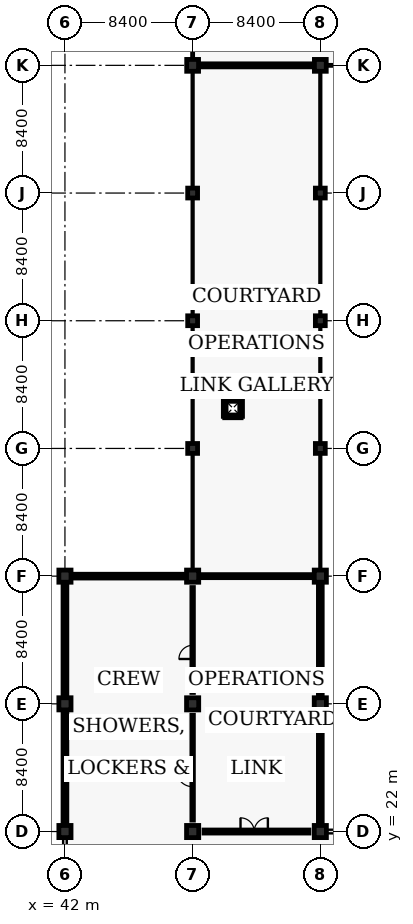
"""IFC4 building model, lengths in metres.
Left out: names, types, materials, properties, quantities, classifications, styles, units other than length and angle.
Written with IfcOpenShell. Run it as: python <this file> out.ifc"""

import sys

from ifc_helpers import new_model, si_unit, direction, frame, frame_2d, origin, origin_2d, place, context, subcontext, project, spatial, rectangle, circle, extrude, element, fill, save


model = new_model("IFC4")
c1 = context("Model", 3, precision=1e-05, world=origin(), true_north=direction((0.0, 1.0)))
c2 = subcontext(c1, "Body", "Model", "MODEL_VIEW")
j1 = project(units=[si_unit("LENGTHUNIT", "METRE"), si_unit("PLANEANGLEUNIT", "RADIAN")], contexts=[c1])
p1 = place(None, origin())
s1 = spatial("IfcSite", under=j1, at=p1, CompositionType="ELEMENT")
p2 = place(p1, origin())
s2 = spatial("IfcBuilding", under=s1, at=p2, CompositionType="ELEMENT")
p3 = place(p2, frame((0.0, 0.0, 5.44)))
s3 = spatial("IfcBuildingStorey", under=s2, at=p3, CompositionType="ELEMENT", Elevation=5.44)
for number, where, z_axis, x_axis in (
    (1, (50.4, 47.2, 0.0), (0.0, 0.0, 1.0), (1.0, 0.0, 0.0)),
    (2, (50.4, 55.6, 0.0), (0.0, 0.0, 1.0), (1.0, 0.0, 0.0)),
    (3, (50.4, 64.0, 0.0), (0.0, 0.0, 1.0), (1.0, 0.0, 0.0)),
    (4, (58.8, 47.2, 0.0), (0.0, 0.0, 1.0), (1.0, 0.0, 0.0)),
    (5, (58.8, 55.6, 0.0), (0.0, 0.0, 1.0), (1.0, 0.0, 0.0)),
    (6, (58.8, 64.0, 0.0), (0.0, 0.0, 1.0), (1.0, 0.0, 0.0)),
):
    element("IfcColumn", number, at=place(p3, frame(where, z_axis=z_axis, x_axis=x_axis)), inside=s3, PredefinedType="COLUMN", context=c2, shape_type="SweptSolid", body=[
        extrude(circle(Radius=0.325, at=origin_2d()), origin(), (0.0, 0.0, 1.0), 4.16),
    ])
for number, where, z_axis, x_axis in (
    (7, (50.4, 72.4, 0.0), (0.0, 0.0, 1.0), (1.0, 0.0, 0.0)),
    (8, (58.8, 72.4, 0.0), (0.0, 0.0, 1.0), (1.0, 0.0, 0.0)),
):
    element("IfcColumn", number, at=place(p3, frame(where, z_axis=z_axis, x_axis=x_axis)), inside=s3, PredefinedType="COLUMN", context=c2, shape_type="SweptSolid", body=[
        extrude(circle(Radius=0.39, at=origin_2d()), origin(), (0.0, 0.0, 1.0), 4.16),
    ])
for number, where, z_axis, x_axis in (
    (9, (42.0, 22.0, 0.0), (0.0, 0.0, 1.0), (1.0, 0.0, 0.0)),
    (10, (50.4, 22.0, 0.0), (0.0, 0.0, 1.0), (1.0, 0.0, 0.0)),
    (11, (58.8, 22.0, 0.0), (0.0, 0.0, 1.0), (1.0, 0.0, 0.0)),
    (12, (42.0, 30.4, 0.0), (0.0, 0.0, 1.0), (1.0, 0.0, 0.0)),
    (13, (42.0, 38.8, 0.0), (0.0, 0.0, 1.0), (1.0, 0.0, 0.0)),
    (14, (50.4, 30.4, 0.0), (0.0, 0.0, 1.0), (1.0, 0.0, 0.0)),
    (15, (50.4, 38.8, 0.0), (0.0, 0.0, 1.0), (1.0, 0.0, 0.0)),
    (16, (58.8, 30.4, 0.0), (0.0, 0.0, 1.0), (1.0, 0.0, 0.0)),
    (17, (58.8, 38.8, 0.0), (0.0, 0.0, 1.0), (1.0, 0.0, 0.0)),
):
    element("IfcColumn", number, at=place(p3, frame(where, z_axis=z_axis, x_axis=x_axis)), inside=s3, PredefinedType="COLUMN", context=c2, shape_type="SweptSolid", body=[
        extrude(rectangle(XDim=0.8, YDim=0.8, at=origin_2d()), origin(), (0.0, 0.0, 1.0), 4.16),
    ])
p4 = place(p3, frame((42.0, 30.0, 0.0), z_axis=(0.0, 0.0, 1.0), x_axis=(0.0, -1.0, 0.0)))
e18 = element("IfcWall", 18, at=p4, inside=s3, PredefinedType="SOLIDWALL", context=c2, shape_type="SweptSolid", body=[
    extrude(rectangle(XDim=7.6, YDim=0.25, at=frame_2d((3.8, 0.0))), origin(), (0.0, 0.0, 1.0), 3.345),
])
p5 = place(p4, frame((1.64, 0.0, 0.95)))
e19 = element("IfcOpeningElement", 19, at=p5, cuts=e18, PredefinedType="OPENING", context=c2, shape_type="SweptSolid", body=[
    extrude(rectangle(XDim=1.6, YDim=1.35, at=frame_2d((0.8, 0.675))), frame((0.0, 0.135, 0.0), z_axis=(0.0, -1.0, 0.0), x_axis=(1.0, 0.0, 0.0)), (0.0, 0.0, 1.0), 0.27),
])
p6 = place(p4, frame((4.34, 0.0, 0.95)))
e20 = element("IfcOpeningElement", 20, at=p6, cuts=e18, PredefinedType="OPENING", context=c2, shape_type="SweptSolid", body=[
    extrude(rectangle(XDim=1.3, YDim=1.35, at=frame_2d((0.65, 0.675))), frame((0.0, 0.135, 0.0), z_axis=(0.0, -1.0, 0.0), x_axis=(1.0, 0.0, 0.0)), (0.0, 0.0, 1.0), 0.27),
])
p7 = place(p3, frame((58.8, 22.4, 0.0), z_axis=(0.0, 0.0, 1.0), x_axis=(0.0, 1.0, 0.0)))
e21 = element("IfcWall", 21, at=p7, inside=s3, PredefinedType="SOLIDWALL", context=c2, shape_type="SweptSolid", body=[
    extrude(rectangle(XDim=7.6, YDim=0.25, at=frame_2d((3.8, 0.0))), origin(), (0.0, 0.0, 1.0), 3.345),
])
p8 = place(p7, frame((1.64, 0.0, 0.95)))
e22 = element("IfcOpeningElement", 22, at=p8, cuts=e21, PredefinedType="OPENING", context=c2, shape_type="SweptSolid", body=[
    extrude(rectangle(XDim=1.6, YDim=1.35, at=frame_2d((0.8, 0.675))), frame((0.0, 0.135, 0.0), z_axis=(0.0, -1.0, 0.0), x_axis=(1.0, 0.0, 0.0)), (0.0, 0.0, 1.0), 0.27),
])
p9 = place(p7, frame((4.34, 0.0, 0.95)))
e23 = element("IfcOpeningElement", 23, at=p9, cuts=e21, PredefinedType="OPENING", context=c2, shape_type="SweptSolid", body=[
    extrude(rectangle(XDim=1.3, YDim=1.35, at=frame_2d((0.65, 0.675))), frame((0.0, 0.135, 0.0), z_axis=(0.0, -1.0, 0.0), x_axis=(1.0, 0.0, 0.0)), (0.0, 0.0, 1.0), 0.27),
])
p10 = place(p3, frame((42.0, 38.4, 0.0), z_axis=(0.0, 0.0, 1.0), x_axis=(0.0, -1.0, 0.0)))
e24 = element("IfcWall", 24, at=p10, inside=s3, PredefinedType="SOLIDWALL", context=c2, shape_type="SweptSolid", body=[
    extrude(rectangle(XDim=7.6, YDim=0.25, at=frame_2d((3.8, 0.0))), origin(), (0.0, 0.0, 1.0), 3.345),
])
p11 = place(p10, frame((1.64, 0.0, 0.95)))
e25 = element("IfcOpeningElement", 25, at=p11, cuts=e24, PredefinedType="OPENING", context=c2, shape_type="SweptSolid", body=[
    extrude(rectangle(XDim=1.6, YDim=1.35, at=frame_2d((0.8, 0.675))), frame((0.0, 0.135, 0.0), z_axis=(0.0, -1.0, 0.0), x_axis=(1.0, 0.0, 0.0)), (0.0, 0.0, 1.0), 0.27),
])
p12 = place(p10, frame((4.34, 0.0, 0.95)))
e26 = element("IfcOpeningElement", 26, at=p12, cuts=e24, PredefinedType="OPENING", context=c2, shape_type="SweptSolid", body=[
    extrude(rectangle(XDim=1.3, YDim=1.35, at=frame_2d((0.65, 0.675))), frame((0.0, 0.135, 0.0), z_axis=(0.0, -1.0, 0.0), x_axis=(1.0, 0.0, 0.0)), (0.0, 0.0, 1.0), 0.27),
])
p13 = place(p3, frame((58.8, 30.8, 0.0), z_axis=(0.0, 0.0, 1.0), x_axis=(0.0, 1.0, 0.0)))
e27 = element("IfcWall", 27, at=p13, inside=s3, PredefinedType="SOLIDWALL", context=c2, shape_type="SweptSolid", body=[
    extrude(rectangle(XDim=7.6, YDim=0.25, at=frame_2d((3.8, 0.0))), origin(), (0.0, 0.0, 1.0), 3.345),
])
p14 = place(p13, frame((1.64, 0.0, 0.95)))
e28 = element("IfcOpeningElement", 28, at=p14, cuts=e27, PredefinedType="OPENING", context=c2, shape_type="SweptSolid", body=[
    extrude(rectangle(XDim=1.6, YDim=1.35, at=frame_2d((0.8, 0.675))), frame((0.0, 0.135, 0.0), z_axis=(0.0, -1.0, 0.0), x_axis=(1.0, 0.0, 0.0)), (0.0, 0.0, 1.0), 0.27),
])
p15 = place(p13, frame((4.34, 0.0, 0.95)))
e29 = element("IfcOpeningElement", 29, at=p15, cuts=e27, PredefinedType="OPENING", context=c2, shape_type="SweptSolid", body=[
    extrude(rectangle(XDim=1.3, YDim=1.35, at=frame_2d((0.65, 0.675))), frame((0.0, 0.135, 0.0), z_axis=(0.0, -1.0, 0.0), x_axis=(1.0, 0.0, 0.0)), (0.0, 0.0, 1.0), 0.27),
])
p16 = place(p3, frame((50.0, 38.8, 0.0), z_axis=(0.0, 0.0, 1.0), x_axis=(-1.0, 0.0, 0.0)))
e30 = element("IfcWall", 30, at=p16, inside=s3, PredefinedType="SOLIDWALL", context=c2, shape_type="SweptSolid", body=[
    extrude(rectangle(XDim=7.6, YDim=0.25, at=frame_2d((3.8, 0.0))), origin(), (0.0, 0.0, 1.0), 3.345),
])
p17 = place(p16, frame((1.49, 0.0, 0.95)))
e31 = element("IfcOpeningElement", 31, at=p17, cuts=e30, PredefinedType="OPENING", context=c2, shape_type="SweptSolid", body=[
    extrude(rectangle(XDim=2.4, YDim=1.5, at=frame_2d((1.2, 0.75))), frame((0.0, 0.135, 0.0), z_axis=(0.0, -1.0, 0.0), x_axis=(1.0, 0.0, 0.0)), (0.0, 0.0, 1.0), 0.27),
])
p18 = place(p16, frame((4.29, 0.0, 1.35)))
e32 = element("IfcOpeningElement", 32, at=p18, cuts=e30, PredefinedType="OPENING", context=c2, shape_type="SweptSolid", body=[
    extrude(rectangle(XDim=2.8, YDim=1.05, at=frame_2d((1.4, 0.525))), frame((0.0, 0.135, 0.0), z_axis=(0.0, -1.0, 0.0), x_axis=(1.0, 0.0, 0.0)), (0.0, 0.0, 1.0), 0.27),
])
p19 = place(p3, frame((52.51, 49.31, 0.0), z_axis=(0.0, 0.0, 1.0), x_axis=(1.0, 0.0, 0.0)))
e33 = element("IfcWall", 33, at=p19, inside=s3, PredefinedType="SOLIDWALL", context=c2, shape_type="SweptSolid", body=[
    extrude(rectangle(XDim=1.08, YDim=0.18, at=frame_2d((0.54, 0.0))), origin(), (0.0, 0.0, 1.0), 2.6),
])
p20 = place(p3, frame((53.59, 49.31, 0.0), z_axis=(0.0, 0.0, 1.0), x_axis=(0.0, 1.0, 0.0)))
e34 = element("IfcWall", 34, at=p20, inside=s3, PredefinedType="SOLIDWALL", context=c2, shape_type="SweptSolid", body=[
    extrude(rectangle(XDim=1.08, YDim=0.18, at=frame_2d((0.54, 0.0))), origin(), (0.0, 0.0, 1.0), 2.6),
])
p21 = place(p3, frame((53.59, 50.39, 0.0), z_axis=(0.0, 0.0, 1.0), x_axis=(-1.0, 0.0, 0.0)))
e35 = element("IfcWall", 35, at=p21, inside=s3, PredefinedType="SOLIDWALL", context=c2, shape_type="SweptSolid", body=[
    extrude(rectangle(XDim=1.08, YDim=0.18, at=frame_2d((0.54, 0.0))), origin(), (0.0, 0.0, 1.0), 2.6),
])
p22 = place(p3, frame((52.51, 50.39, 0.0), z_axis=(0.0, 0.0, 1.0), x_axis=(0.0, -1.0, 0.0)))
e36 = element("IfcWall", 36, at=p22, inside=s3, PredefinedType="SOLIDWALL", context=c2, shape_type="SweptSolid", body=[
    extrude(rectangle(XDim=1.08, YDim=0.18, at=frame_2d((0.54, 0.0))), origin(), (0.0, 0.0, 1.0), 2.6),
])
p23 = place(p3, frame((50.85, 38.8, 0.0), z_axis=(0.0, 0.0, 1.0), x_axis=(1.0, 0.0, 0.0)))
e37 = element("IfcWall", 37, at=p23, inside=s3, PredefinedType="SOLIDWALL", context=c2, shape_type="SweptSolid", body=[
    extrude(rectangle(XDim=7.5, YDim=0.2, at=frame_2d((3.75, 0.0))), origin(), (0.0, 0.0, 1.0), 3.465),
])
p24 = place(p23, frame((2.5, 0.0, 0.0)))
e38 = element("IfcOpeningElement", 38, at=p24, cuts=e37, PredefinedType="OPENING", context=c2, shape_type="SweptSolid", body=[
    extrude(rectangle(XDim=2.1, YDim=2.22, at=frame_2d((1.05, 1.11))), frame((0.0, 0.11, 0.0), z_axis=(0.0, -1.0, 0.0), x_axis=(1.0, 0.0, 0.0)), (0.0, 0.0, 1.0), 0.22),
])
p25 = place(p3, frame((50.85, 72.4, 0.0), z_axis=(0.0, 0.0, 1.0), x_axis=(1.0, 0.0, 0.0)))
e39 = element("IfcWall", 39, at=p25, inside=s3, PredefinedType="SOLIDWALL", context=c2, shape_type="SweptSolid", body=[
    extrude(rectangle(XDim=7.5, YDim=0.2, at=frame_2d((3.75, 0.0))), origin(), (0.0, 0.0, 1.0), 3.665),
])
p26 = place(p25, frame((2.5, 0.0, 0.0)))
e40 = element("IfcOpeningElement", 40, at=p26, cuts=e39, PredefinedType="OPENING", context=c2, shape_type="SweptSolid", body=[
    extrude(rectangle(XDim=2.1, YDim=2.22, at=frame_2d((1.05, 1.11))), frame((0.0, 0.11, 0.0), z_axis=(0.0, -1.0, 0.0), x_axis=(1.0, 0.0, 0.0)), (0.0, 0.0, 1.0), 0.22),
])
p27 = place(p3, frame((50.4, 22.75, 0.0), z_axis=(0.0, 0.0, 1.0), x_axis=(0.0, 1.0, 0.0)))
e41 = element("IfcWall", 41, at=p27, inside=s3, PredefinedType="PARTITIONING", context=c2, shape_type="SweptSolid", body=[
    extrude(rectangle(XDim=6.9, YDim=0.1, at=frame_2d((3.45, 0.0))), origin(), (0.0, 0.0, 1.0), 2.65),
])
p28 = place(p27, frame((2.2, 0.0, 0.0)))
e42 = element("IfcOpeningElement", 42, at=p28, cuts=e41, PredefinedType="OPENING", context=c2, shape_type="SweptSolid", body=[
    extrude(rectangle(XDim=1.06, YDim=2.1, at=frame_2d((0.53, 1.05))), frame((0.0, 0.06, 0.0), z_axis=(0.0, -1.0, 0.0), x_axis=(1.0, 0.0, 0.0)), (0.0, 0.0, 1.0), 0.12),
])
p29 = place(p3, frame((50.4, 31.15, 0.0), z_axis=(0.0, 0.0, 1.0), x_axis=(0.0, 1.0, 0.0)))
e43 = element("IfcWall", 43, at=p29, inside=s3, PredefinedType="PARTITIONING", context=c2, shape_type="SweptSolid", body=[
    extrude(rectangle(XDim=6.9, YDim=0.1, at=frame_2d((3.45, 0.0))), origin(), (0.0, 0.0, 1.0), 2.65),
])
p30 = place(p29, frame((2.2, 0.0, 0.0)))
e44 = element("IfcOpeningElement", 44, at=p30, cuts=e43, PredefinedType="OPENING", context=c2, shape_type="SweptSolid", body=[
    extrude(rectangle(XDim=0.9, YDim=2.06, at=frame_2d((0.45, 1.03))), frame((0.0, 0.06, 0.0), z_axis=(0.0, -1.0, 0.0), x_axis=(1.0, 0.0, 0.0)), (0.0, 0.0, 1.0), 0.12),
])
p31 = place(p3, frame((51.15, 22.0, 0.0), z_axis=(0.0, 0.0, 1.0), x_axis=(1.0, 0.0, 0.0)))
e45 = element("IfcWall", 45, at=p31, inside=s3, PredefinedType="SOLIDWALL", context=c2, shape_type="SweptSolid", body=[
    extrude(rectangle(XDim=6.9, YDim=0.2, at=frame_2d((3.45, 0.0))), origin(), (0.0, 0.0, 1.0), 2.65),
])
p32 = place(p31, frame((2.4, 0.0, 0.0)))
e46 = element("IfcOpeningElement", 46, at=p32, cuts=e45, PredefinedType="OPENING", context=c2, shape_type="SweptSolid", body=[
    extrude(rectangle(XDim=1.8, YDim=2.18, at=frame_2d((0.9, 1.09))), frame((0.0, 0.11, 0.0), z_axis=(0.0, -1.0, 0.0), x_axis=(1.0, 0.0, 0.0)), (0.0, 0.0, 1.0), 0.22),
])
p33 = place(p5, origin())
e47 = element("IfcWindow", 47, at=p33, inside=s3, PartitioningType="DOUBLE_PANEL_VERTICAL", PredefinedType="WINDOW", context=c2, shape_type="SweptSolid", body=[
    extrude(rectangle(XDim=1.6, YDim=1.35, at=frame_2d((0.8, 0.675))), frame((0.0, 0.03, 0.0), z_axis=(0.0, -1.0, 0.0), x_axis=(1.0, 0.0, 0.0)), (0.0, 0.0, 1.0), 0.06),
])
fill(e19, e47)
p34 = place(p6, origin())
e48 = element("IfcWindow", 48, at=p34, inside=s3, PartitioningType="SINGLE_PANEL", PredefinedType="WINDOW", context=c2, shape_type="SweptSolid", body=[
    extrude(rectangle(XDim=1.3, YDim=1.35, at=frame_2d((0.65, 0.675))), frame((0.0, 0.03, 0.0), z_axis=(0.0, -1.0, 0.0), x_axis=(1.0, 0.0, 0.0)), (0.0, 0.0, 1.0), 0.06),
])
fill(e20, e48)
p35 = place(p8, origin())
e49 = element("IfcWindow", 49, at=p35, inside=s3, PartitioningType="DOUBLE_PANEL_VERTICAL", PredefinedType="WINDOW", context=c2, shape_type="SweptSolid", body=[
    extrude(rectangle(XDim=1.6, YDim=1.35, at=frame_2d((0.8, 0.675))), frame((0.0, 0.03, 0.0), z_axis=(0.0, -1.0, 0.0), x_axis=(1.0, 0.0, 0.0)), (0.0, 0.0, 1.0), 0.06),
])
fill(e22, e49)
p36 = place(p9, origin())
e50 = element("IfcWindow", 50, at=p36, inside=s3, PartitioningType="SINGLE_PANEL", PredefinedType="WINDOW", context=c2, shape_type="SweptSolid", body=[
    extrude(rectangle(XDim=1.3, YDim=1.35, at=frame_2d((0.65, 0.675))), frame((0.0, 0.03, 0.0), z_axis=(0.0, -1.0, 0.0), x_axis=(1.0, 0.0, 0.0)), (0.0, 0.0, 1.0), 0.06),
])
fill(e23, e50)
p37 = place(p11, origin())
e51 = element("IfcWindow", 51, at=p37, inside=s3, PartitioningType="DOUBLE_PANEL_VERTICAL", PredefinedType="WINDOW", context=c2, shape_type="SweptSolid", body=[
    extrude(rectangle(XDim=1.6, YDim=1.35, at=frame_2d((0.8, 0.675))), frame((0.0, 0.03, 0.0), z_axis=(0.0, -1.0, 0.0), x_axis=(1.0, 0.0, 0.0)), (0.0, 0.0, 1.0), 0.06),
])
fill(e25, e51)
p38 = place(p12, origin())
e52 = element("IfcWindow", 52, at=p38, inside=s3, PartitioningType="SINGLE_PANEL", PredefinedType="WINDOW", context=c2, shape_type="SweptSolid", body=[
    extrude(rectangle(XDim=1.3, YDim=1.35, at=frame_2d((0.65, 0.675))), frame((0.0, 0.03, 0.0), z_axis=(0.0, -1.0, 0.0), x_axis=(1.0, 0.0, 0.0)), (0.0, 0.0, 1.0), 0.06),
])
fill(e26, e52)
p39 = place(p14, origin())
e53 = element("IfcWindow", 53, at=p39, inside=s3, PartitioningType="DOUBLE_PANEL_VERTICAL", PredefinedType="WINDOW", context=c2, shape_type="SweptSolid", body=[
    extrude(rectangle(XDim=1.6, YDim=1.35, at=frame_2d((0.8, 0.675))), frame((0.0, 0.03, 0.0), z_axis=(0.0, -1.0, 0.0), x_axis=(1.0, 0.0, 0.0)), (0.0, 0.0, 1.0), 0.06),
])
fill(e28, e53)
p40 = place(p15, origin())
e54 = element("IfcWindow", 54, at=p40, inside=s3, PartitioningType="SINGLE_PANEL", PredefinedType="WINDOW", context=c2, shape_type="SweptSolid", body=[
    extrude(rectangle(XDim=1.3, YDim=1.35, at=frame_2d((0.65, 0.675))), frame((0.0, 0.03, 0.0), z_axis=(0.0, -1.0, 0.0), x_axis=(1.0, 0.0, 0.0)), (0.0, 0.0, 1.0), 0.06),
])
fill(e29, e54)
p41 = place(p17, origin())
e55 = element("IfcWindow", 55, at=p41, inside=s3, PartitioningType="TRIPLE_PANEL_VERTICAL", PredefinedType="WINDOW", context=c2, shape_type="SweptSolid", body=[
    extrude(rectangle(XDim=2.4, YDim=1.5, at=frame_2d((1.2, 0.75))), frame((0.0, 0.03, 0.0), z_axis=(0.0, -1.0, 0.0), x_axis=(1.0, 0.0, 0.0)), (0.0, 0.0, 1.0), 0.06),
])
fill(e31, e55)
p42 = place(p18, origin())
e56 = element("IfcWindow", 56, at=p42, inside=s3, PartitioningType="TRIPLE_PANEL_VERTICAL", PredefinedType="WINDOW", context=c2, shape_type="SweptSolid", body=[
    extrude(rectangle(XDim=2.8, YDim=1.05, at=frame_2d((1.4, 0.525))), frame((0.0, 0.03, 0.0), z_axis=(0.0, -1.0, 0.0), x_axis=(1.0, 0.0, 0.0)), (0.0, 0.0, 1.0), 0.06),
])
fill(e32, e56)
p43 = place(p24, origin())
e57 = element("IfcDoor", 57, at=p43, inside=s3, OperationType="DOUBLE_DOOR_SLIDING", PredefinedType="DOOR", context=c2, shape_type="SweptSolid", body=[
    extrude(rectangle(XDim=2.1, YDim=2.22, at=frame_2d((1.05, 1.11))), frame((0.0, 0.025, 0.0), z_axis=(0.0, -1.0, 0.0), x_axis=(1.0, 0.0, 0.0)), (0.0, 0.0, 1.0), 0.05),
])
fill(e38, e57)
p44 = place(p26, origin())
e58 = element("IfcDoor", 58, at=p44, inside=s3, OperationType="DOUBLE_DOOR_SLIDING", PredefinedType="DOOR", context=c2, shape_type="SweptSolid", body=[
    extrude(rectangle(XDim=2.1, YDim=2.22, at=frame_2d((1.05, 1.11))), frame((0.0, 0.025, 0.0), z_axis=(0.0, -1.0, 0.0), x_axis=(1.0, 0.0, 0.0)), (0.0, 0.0, 1.0), 0.05),
])
fill(e40, e58)
p45 = place(p28, origin())
e59 = element("IfcDoor", 59, at=p45, inside=s3, OperationType="SINGLE_SWING_RIGHT", PredefinedType="DOOR", context=c2, shape_type="SweptSolid", body=[
    extrude(rectangle(XDim=1.06, YDim=2.1, at=frame_2d((0.53, 1.05))), frame((0.0, 0.025, 0.0), z_axis=(0.0, -1.0, 0.0), x_axis=(1.0, 0.0, 0.0)), (0.0, 0.0, 1.0), 0.05),
])
fill(e42, e59)
p46 = place(p30, origin())
e60 = element("IfcDoor", 60, at=p46, inside=s3, OperationType="SINGLE_SWING_LEFT", PredefinedType="DOOR", context=c2, shape_type="SweptSolid", body=[
    extrude(rectangle(XDim=0.9, YDim=2.06, at=frame_2d((0.45, 1.03))), frame((0.0, 0.025, 0.0), z_axis=(0.0, -1.0, 0.0), x_axis=(1.0, 0.0, 0.0)), (0.0, 0.0, 1.0), 0.05),
])
fill(e44, e60)
p47 = place(p32, origin())
e61 = element("IfcDoor", 61, at=p47, inside=s3, OperationType="DOUBLE_DOOR_SINGLE_SWING", PredefinedType="DOOR", context=c2, shape_type="SweptSolid", body=[
    extrude(rectangle(XDim=1.8, YDim=2.18, at=frame_2d((0.9, 1.09))), frame((0.0, 0.025, 0.0), z_axis=(0.0, -1.0, 0.0), x_axis=(1.0, 0.0, 0.0)), (0.0, 0.0, 1.0), 0.05),
])
fill(e46, e61)
save(model, sys.argv[1])
